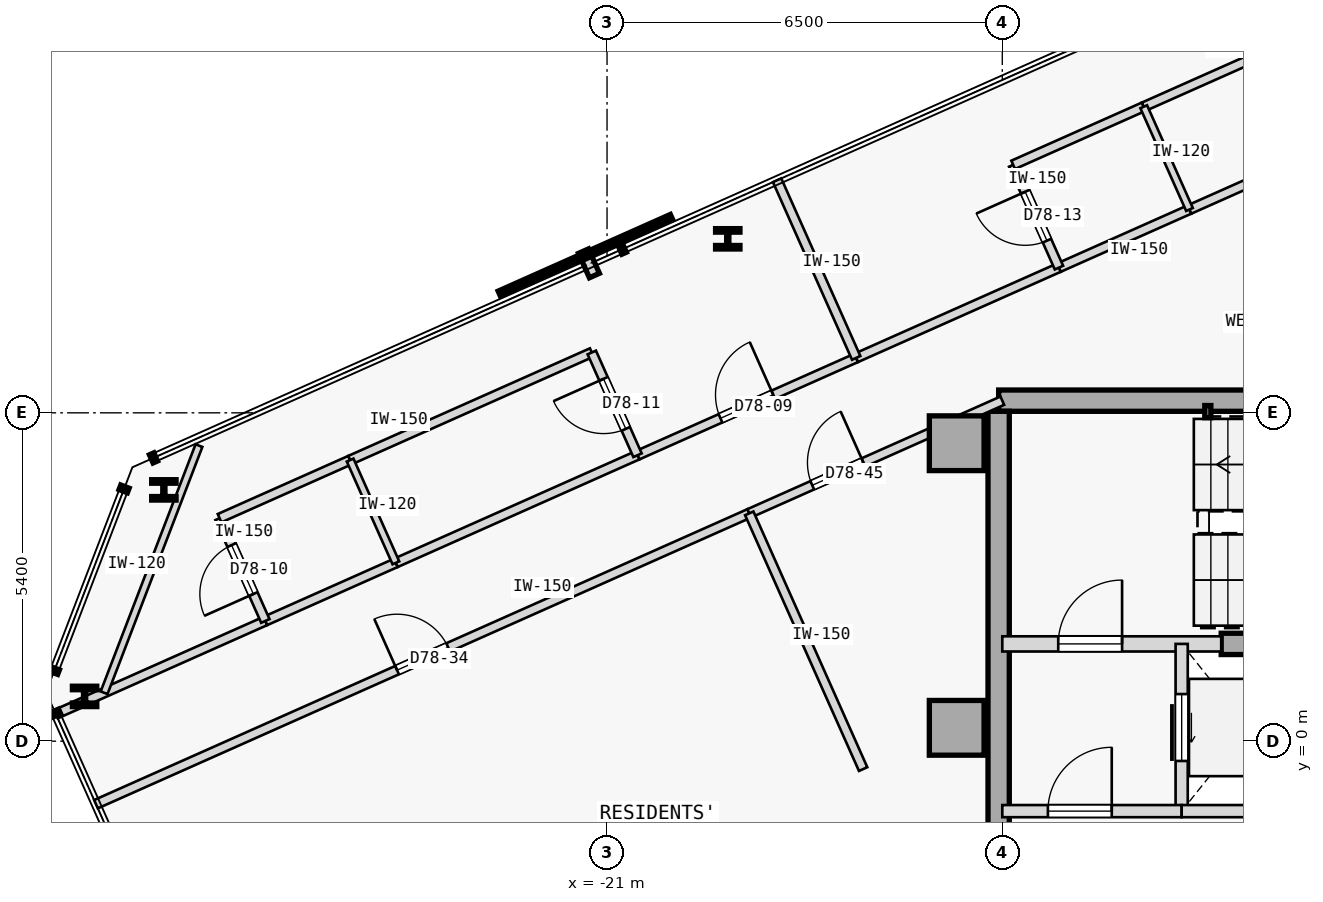
"""IFC4 building model, lengths in metres.
Left out: names, types, materials, properties, quantities, classifications, styles, units other than length and angle.
Written with IfcOpenShell. Run it as: python <this file> out.ifc"""

import sys

from ifc_helpers import new_model, si_unit, direction, frame, frame_2d, origin, origin_2d, place, context, subcontext, project, spatial, rectangle, hollow_rectangle, i_section, extrude, element, fill, save


model = new_model("IFC4")
c1 = context("Model", 3, precision=1e-05, world=origin(), true_north=direction((0.0, 1.0)))
c2 = subcontext(c1, "Body", "Model", "MODEL_VIEW")
j1 = project(units=[si_unit("LENGTHUNIT", "METRE"), si_unit("PLANEANGLEUNIT", "RADIAN")], contexts=[c1])
p1 = place(None, origin())
s1 = spatial("IfcSite", under=j1, at=p1, CompositionType="ELEMENT")
p2 = place(p1, origin())
s2 = spatial("IfcBuilding", under=s1, at=p2, CompositionType="ELEMENT")
p3 = place(p2, frame((0.0, 0.0, 291.95)))
s3 = spatial("IfcBuildingStorey", under=s2, at=p3, CompositionType="ELEMENT", Elevation=291.95)
for number, where, z_axis, x_axis in (
    (1, (-15.25, 4.9, 0.0), (0.0, 0.0, 1.0), (1.0, 0.0, 0.0)),
    (2, (-15.25, 0.22, 0.0), (0.0, 0.0, 1.0), (1.0, 0.0, 0.0)),
):
    element("IfcColumn", number, at=place(p3, frame(where, z_axis=z_axis, x_axis=x_axis)), inside=s3, PredefinedType="COLUMN", context=c2, shape_type="SweptSolid", body=[
        extrude(rectangle(XDim=0.9, YDim=0.9, at=origin_2d()), origin(), (0.0, 0.0, 1.0), 3.35),
    ])
p4 = place(p3, frame((-14.56, 5.6, 0.0), z_axis=(0.0, 0.0, 1.0), x_axis=(1.0, 0.0, 0.0)))
e3 = element("IfcWall", 3, at=p4, inside=s3, PredefinedType="SHEAR", context=c2, shape_type="SweptSolid", body=[
    extrude(rectangle(XDim=11.41, YDim=0.35, at=frame_2d((5.705, 0.0))), origin(), (0.0, 0.0, 1.0), 3.125),
])
p5 = place(p3, frame((-14.56, -5.425, 0.0), z_axis=(0.0, 0.0, 1.0), x_axis=(0.0, 1.0, 0.0)))
e4 = element("IfcWall", 4, at=p5, inside=s3, PredefinedType="SHEAR", context=c2, shape_type="SweptSolid", body=[
    extrude(rectangle(XDim=10.85, YDim=0.35, at=frame_2d((5.425, 0.0))), origin(), (0.0, 0.0, 1.0), 3.125),
])
p6 = place(p3, frame((-10.9, 1.6, 0.0), z_axis=(0.0, 0.0, 1.0), x_axis=(1.0, 0.0, 0.0)))
e5 = element("IfcWall", 5, at=p6, inside=s3, PredefinedType="SHEAR", context=c2, shape_type="SweptSolid", body=[
    extrude(rectangle(XDim=5.15, YDim=0.35, at=frame_2d((2.575, 0.0))), origin(), (0.0, 0.0, 1.0), 3.125),
])
p7 = place(p3, frame((-11.12, 5.42, 0.0), z_axis=(0.0, 0.0, 1.0), x_axis=(1.0, 0.0, 0.0)))
e6 = element("IfcColumn", 6, at=p7, inside=s3, PredefinedType="COLUMN", context=c2, shape_type="SweptSolid", body=[
    extrude(hollow_rectangle(XDim=0.1, YDim=0.2, WallThickness=0.008, at=origin_2d()), origin(), (0.0, 0.0, 1.0), 3.35),
])
for number, where, z_axis, x_axis in (
    (7, (-19.015, 8.262, 0.0), (0.0, 0.0, 1.0), (1.0, 0.0, 0.0)),
    (8, (-28.288, 4.133, 0.0), (0.0, 0.0, 1.0), (1.0, 0.0, 0.0)),
    (9, (-29.592, 0.737, 0.0), (0.0, 0.0, 1.0), (1.0, 0.0, 0.0)),
):
    element("IfcColumn", number, at=place(p3, frame(where, z_axis=z_axis, x_axis=x_axis)), inside=s3, PredefinedType="COLUMN", context=c2, shape_type="SweptSolid", body=[
        extrude(i_section(OverallWidth=0.401, OverallDepth=0.335, WebThickness=0.036, FlangeThickness=0.058, FilletRadius=0.015, at=origin_2d()), origin(), (0.0, 0.0, 1.0), 3.35),
    ])
p8 = place(p3, frame((-14.5, 1.6, 0.0), z_axis=(0.0, 0.0, 1.0), x_axis=(1.0, 0.0, 0.0)))
e10 = element("IfcWall", 10, at=p8, inside=s3, PredefinedType="STANDARD", context=c2, shape_type="SweptSolid", body=[
    extrude(rectangle(XDim=3.6, YDim=0.25, at=frame_2d((1.8, 0.0))), origin(), (0.0, 0.0, 1.0), 3.125),
])
p9 = place(p8, frame((0.92, 0.0, 0.0)))
e11 = element("IfcOpeningElement", 11, at=p9, cuts=e10, PredefinedType="OPENING", context=c2, shape_type="SweptSolid", body=[
    extrude(rectangle(XDim=1.05, YDim=2.15, at=frame_2d((0.525, 1.075))), frame((0.0, 0.135, 0.0), z_axis=(0.0, -1.0, 0.0), x_axis=(1.0, 0.0, 0.0)), (0.0, 0.0, 1.0), 0.27),
])
p10 = place(p3, frame((-11.55, -1.15, 0.0), z_axis=(0.0, 0.0, 1.0), x_axis=(0.0, 1.0, 0.0)))
e12 = element("IfcWall", 12, at=p10, inside=s3, PredefinedType="STANDARD", context=c2, shape_type="SweptSolid", body=[
    extrude(rectangle(XDim=2.75, YDim=0.2, at=frame_2d((1.375, 0.0))), origin(), (0.0, 0.0, 1.0), 3.125),
])
p11 = place(p10, frame((0.825, 0.0, 0.0)))
e13 = element("IfcOpeningElement", 13, at=p11, cuts=e12, PredefinedType="OPENING", context=c2, shape_type="SweptSolid", body=[
    extrude(rectangle(XDim=1.1, YDim=2.15, at=frame_2d((0.55, 1.075))), frame((0.0, 0.11, 0.0), z_axis=(0.0, -1.0, 0.0), x_axis=(1.0, 0.0, 0.0)), (0.0, 0.0, 1.0), 0.22),
])
p12 = place(p3, frame((-14.5, -1.15, 0.0), z_axis=(0.0, 0.0, 1.0), x_axis=(1.0, 0.0, 0.0)))
e14 = element("IfcWall", 14, at=p12, inside=s3, PredefinedType="STANDARD", context=c2, shape_type="SweptSolid", body=[
    extrude(rectangle(XDim=2.95, YDim=0.2, at=frame_2d((1.475, 0.0))), origin(), (0.0, 0.0, 1.0), 3.125),
])
p13 = place(p12, frame((0.75, 0.0, 0.0)))
e15 = element("IfcOpeningElement", 15, at=p13, cuts=e14, PredefinedType="OPENING", context=c2, shape_type="SweptSolid", body=[
    extrude(rectangle(XDim=1.05, YDim=2.18, at=frame_2d((0.525, 1.09))), frame((0.0, 0.11, 0.0), z_axis=(0.0, -1.0, 0.0), x_axis=(1.0, 0.0, 0.0)), (0.0, 0.0, 1.0), 0.22),
])
p14 = place(p3, frame((-11.55, -1.15, 0.0), z_axis=(0.0, 0.0, 1.0), x_axis=(1.0, 0.0, 0.0)))
e16 = element("IfcWall", 16, at=p14, inside=s3, PredefinedType="STANDARD", context=c2, shape_type="SweptSolid", body=[
    extrude(rectangle(XDim=2.2, YDim=0.2, at=frame_2d((1.1, 0.0))), origin(), (0.0, 0.0, 1.0), 3.125),
])
p15 = place(p3, frame((-30.063, 0.444, 0.0), z_axis=(0.0, 0.0, 1.0), x_axis=(0.913541633228, 0.406745232743, 0.0)))
e17 = element("IfcWall", 17, at=p15, inside=s3, PredefinedType="PARTITIONING", context=c2, shape_type="SweptSolid", body=[
    extrude(rectangle(XDim=3.77, YDim=0.15, at=frame_2d((1.885, 0.0))), origin(), (0.0, 0.0, 1.0), 3.125),
])
p16 = place(p3, frame((-20.499, 4.702, 0.0), z_axis=(0.0, 0.0, 1.0), x_axis=(0.913553019012, 0.406719659537, 0.0)))
e18 = element("IfcWall", 18, at=p16, inside=s3, PredefinedType="PARTITIONING", context=c2, shape_type="SweptSolid", body=[
    extrude(rectangle(XDim=3.936, YDim=0.15, at=frame_2d((1.968, 0.0))), origin(), (0.0, 0.0, 1.0), 3.125),
])
p17 = place(p16, frame((1.493, 0.0, 0.0)))
e19 = element("IfcOpeningElement", 19, at=p17, cuts=e18, PredefinedType="OPENING", context=c2, shape_type="SweptSolid", body=[
    extrude(rectangle(XDim=0.95, YDim=2.15, at=frame_2d((0.475, 1.075))), frame((0.0, 0.085, 0.0), z_axis=(0.0, -1.0, 0.0), x_axis=(1.0, 0.0, 0.0)), (0.0, 0.0, 1.0), 0.17),
])
p18 = place(p3, frame((-26.619, 1.977, 0.0), z_axis=(0.0, 0.0, 1.0), x_axis=(0.913541436194, 0.406745675276, 0.0)))
e20 = element("IfcWall", 20, at=p18, inside=s3, PredefinedType="PARTITIONING", context=c2, shape_type="SweptSolid", body=[
    extrude(rectangle(XDim=2.35, YDim=0.15, at=frame_2d((1.175, 0.0))), origin(), (0.0, 0.0, 1.0), 3.125),
])
p19 = place(p3, frame((-24.472, 2.933, 0.0), z_axis=(0.0, 0.0, 1.0), x_axis=(0.913545193015, 0.406737237438, 0.0)))
e21 = element("IfcWall", 21, at=p19, inside=s3, PredefinedType="PARTITIONING", context=c2, shape_type="SweptSolid", body=[
    extrude(rectangle(XDim=4.35, YDim=0.15, at=frame_2d((2.175, 0.0))), origin(), (0.0, 0.0, 1.0), 3.125),
])
p20 = place(p3, frame((-16.903, 6.303, 0.0), z_axis=(0.0, 0.0, 1.0), x_axis=(0.913543802, 0.40674036169, 0.0)))
e22 = element("IfcWall", 22, at=p20, inside=s3, PredefinedType="PARTITIONING", context=c2, shape_type="SweptSolid", body=[
    extrude(rectangle(XDim=3.65, YDim=0.15, at=frame_2d((1.825, 0.0))), origin(), (0.0, 0.0, 1.0), 3.125),
])
p21 = place(p3, frame((-13.568, 7.788, 0.0), z_axis=(0.0, 0.0, 1.0), x_axis=(0.913558622212, 0.406707073682, 0.0)))
e23 = element("IfcWall", 23, at=p21, inside=s3, PredefinedType="PARTITIONING", context=c2, shape_type="SweptSolid", body=[
    extrude(rectangle(XDim=2.35, YDim=0.15, at=frame_2d((1.175, 0.0))), origin(), (0.0, 0.0, 1.0), 3.125),
])
p22 = place(p3, frame((-11.421, 8.744, 0.0), z_axis=(0.0, 0.0, 1.0), x_axis=(0.913539234326, 0.406750620585, 0.0)))
e24 = element("IfcWall", 24, at=p22, inside=s3, PredefinedType="PARTITIONING", context=c2, shape_type="SweptSolid", body=[
    extrude(rectangle(XDim=3.922, YDim=0.15, at=frame_2d((1.961, 0.0))), origin(), (0.0, 0.0, 1.0), 3.125),
])
p23 = place(p3, frame((-29.404, -1.036, 0.0), z_axis=(0.0, 0.0, 1.0), x_axis=(0.913544247064, 0.406739362069, 0.0)))
e25 = element("IfcWall", 25, at=p23, inside=s3, PredefinedType="PARTITIONING", context=c2, shape_type="SweptSolid", body=[
    extrude(rectangle(XDim=11.76, YDim=0.15, at=frame_2d((5.88, 0.0))), origin(), (0.0, 0.0, 1.0), 3.125),
])
p24 = place(p23, frame((5.42, 0.0, 0.0)))
e26 = element("IfcOpeningElement", 26, at=p24, cuts=e25, PredefinedType="OPENING", context=c2, shape_type="SweptSolid", body=[
    extrude(rectangle(XDim=0.92, YDim=2.15, at=frame_2d((0.46, 1.075))), frame((0.0, 0.085, 0.0), z_axis=(0.0, -1.0, 0.0), x_axis=(1.0, 0.0, 0.0)), (0.0, 0.0, 1.0), 0.17),
])
p25 = place(p3, frame((-18.661, 3.747, 0.0), z_axis=(0.0, 0.0, 1.0), x_axis=(0.913535055583, 0.40676000568, 0.0)))
e27 = element("IfcWall", 27, at=p25, inside=s3, PredefinedType="PARTITIONING", context=c2, shape_type="SweptSolid", body=[
    extrude(rectangle(XDim=4.555, YDim=0.15, at=frame_2d((2.277, 0.0))), origin(), (0.0, 0.0, 1.0), 3.125),
])
p26 = place(p25, frame((1.134, 0.0, 0.0)))
e28 = element("IfcOpeningElement", 28, at=p26, cuts=e27, PredefinedType="OPENING", context=c2, shape_type="SweptSolid", body=[
    extrude(rectangle(XDim=0.92, YDim=2.15, at=frame_2d((0.46, 1.075))), frame((0.0, 0.085, 0.0), z_axis=(0.0, -1.0, 0.0), x_axis=(1.0, 0.0, 0.0)), (0.0, 0.0, 1.0), 0.17),
])
p27 = place(p3, frame((-26.619, 1.977, 0.0), z_axis=(0.0, 0.0, 1.0), x_axis=(-0.406750635596, 0.913539227643, 0.0)))
e29 = element("IfcWall", 29, at=p27, inside=s3, PredefinedType="PARTITIONING", context=c2, shape_type="SweptSolid", body=[
    extrude(rectangle(XDim=1.85, YDim=0.15, at=frame_2d((0.925, 0.0))), origin(), (0.0, 0.0, 1.0), 3.125),
])
p28 = place(p27, frame((0.485, 0.0, 0.0)))
e30 = element("IfcOpeningElement", 30, at=p28, cuts=e29, PredefinedType="OPENING", context=c2, shape_type="SweptSolid", body=[
    extrude(rectangle(XDim=0.88, YDim=2.15, at=frame_2d((0.44, 1.075))), frame((0.0, 0.085, 0.0), z_axis=(0.0, -1.0, 0.0), x_axis=(1.0, 0.0, 0.0)), (0.0, 0.0, 1.0), 0.17),
])
p29 = place(p3, frame((-27.372, 3.667, 0.0), z_axis=(0.0, 0.0, 1.0), x_axis=(0.913541436194, 0.406745675276, 0.0)))
e31 = element("IfcWall", 31, at=p29, inside=s3, PredefinedType="PARTITIONING", context=c2, shape_type="SweptSolid", body=[
    extrude(rectangle(XDim=2.35, YDim=0.15, at=frame_2d((1.175, 0.0))), origin(), (0.0, 0.0, 1.0), 3.125),
])
p30 = place(p3, frame((-25.225, 4.623, 0.0), z_axis=(0.0, 0.0, 1.0), x_axis=(0.913545193015, 0.406737237438, 0.0)))
e32 = element("IfcWall", 32, at=p30, inside=s3, PredefinedType="PARTITIONING", context=c2, shape_type="SweptSolid", body=[
    extrude(rectangle(XDim=4.35, YDim=0.15, at=frame_2d((2.175, 0.0))), origin(), (0.0, 0.0, 1.0), 3.125),
])
p31 = place(p3, frame((-20.499, 4.702, 0.0), z_axis=(0.0, 0.0, 1.0), x_axis=(-0.406750635596, 0.913539227643, 0.0)))
e33 = element("IfcWall", 33, at=p31, inside=s3, PredefinedType="PARTITIONING", context=c2, shape_type="SweptSolid", body=[
    extrude(rectangle(XDim=1.85, YDim=0.15, at=frame_2d((0.925, 0.0))), origin(), (0.0, 0.0, 1.0), 3.125),
])
p32 = place(p31, frame((0.475, 0.0, 0.0)))
e34 = element("IfcOpeningElement", 34, at=p32, cuts=e33, PredefinedType="OPENING", context=c2, shape_type="SweptSolid", body=[
    extrude(rectangle(XDim=0.9, YDim=2.15, at=frame_2d((0.45, 1.075))), frame((0.0, 0.085, 0.0), z_axis=(0.0, -1.0, 0.0), x_axis=(1.0, 0.0, 0.0)), (0.0, 0.0, 1.0), 0.17),
])
p33 = place(p3, frame((-16.903, 6.303, 0.0), z_axis=(0.0, 0.0, 1.0), x_axis=(-0.406733350739, 0.913546923478, 0.0)))
e35 = element("IfcWall", 35, at=p33, inside=s3, PredefinedType="PARTITIONING", context=c2, shape_type="SweptSolid", body=[
    extrude(rectangle(XDim=3.198, YDim=0.15, at=frame_2d((1.599, 0.0))), origin(), (0.0, 0.0, 1.0), 3.125),
])
p34 = place(p3, frame((-24.472, 2.933, 0.0), z_axis=(0.0, 0.0, 1.0), x_axis=(-0.406750635596, 0.913539227643, 0.0)))
e36 = element("IfcWall", 36, at=p34, inside=s3, PredefinedType="PARTITIONING", context=c2, shape_type="SweptSolid", body=[
    extrude(rectangle(XDim=1.85, YDim=0.12, at=frame_2d((0.925, 0.0))), origin(), (0.0, 0.0, 1.0), 3.125),
])
p35 = place(p3, frame((-13.568, 7.788, 0.0), z_axis=(0.0, 0.0, 1.0), x_axis=(-0.406750635596, 0.913539227643, 0.0)))
e37 = element("IfcWall", 37, at=p35, inside=s3, PredefinedType="PARTITIONING", context=c2, shape_type="SweptSolid", body=[
    extrude(rectangle(XDim=1.85, YDim=0.15, at=frame_2d((0.925, 0.0))), origin(), (0.0, 0.0, 1.0), 3.125),
])
p36 = place(p35, frame((0.485, 0.0, 0.0)))
e38 = element("IfcOpeningElement", 38, at=p36, cuts=e37, PredefinedType="OPENING", context=c2, shape_type="SweptSolid", body=[
    extrude(rectangle(XDim=0.88, YDim=2.15, at=frame_2d((0.44, 1.075))), frame((0.0, 0.085, 0.0), z_axis=(0.0, -1.0, 0.0), x_axis=(1.0, 0.0, 0.0)), (0.0, 0.0, 1.0), 0.17),
])
p37 = place(p3, frame((-14.321, 9.478, 0.0), z_axis=(0.0, 0.0, 1.0), x_axis=(0.913502828817, 0.406832375486, 0.0)))
e39 = element("IfcWall", 39, at=p37, inside=s3, PredefinedType="PARTITIONING", context=c2, shape_type="SweptSolid", body=[
    extrude(rectangle(XDim=2.35, YDim=0.15, at=frame_2d((1.175, 0.0))), origin(), (0.0, 0.0, 1.0), 3.125),
])
p38 = place(p3, frame((-12.174, 10.434, 0.0), z_axis=(0.0, 0.0, 1.0), x_axis=(0.913549532696, 0.406727490232, 0.0)))
e40 = element("IfcWall", 40, at=p38, inside=s3, PredefinedType="PARTITIONING", context=c2, shape_type="SweptSolid", body=[
    extrude(rectangle(XDim=3.922, YDim=0.15, at=frame_2d((1.961, 0.0))), origin(), (0.0, 0.0, 1.0), 3.125),
])
p39 = place(p3, frame((-11.421, 8.744, 0.0), z_axis=(0.0, 0.0, 1.0), x_axis=(-0.406811725227, 0.913512025218, 0.0)))
e41 = element("IfcWall", 41, at=p39, inside=s3, PredefinedType="PARTITIONING", context=c2, shape_type="SweptSolid", body=[
    extrude(rectangle(XDim=1.85, YDim=0.12, at=frame_2d((0.925, 0.0))), origin(), (0.0, 0.0, 1.0), 3.125),
])
p40 = place(p3, frame((-16.789, -0.459, 0.0), z_axis=(0.0, 0.0, 1.0), x_axis=(-0.406738654026, 0.913544562307, 0.0)))
e42 = element("IfcWall", 42, at=p40, inside=s3, PredefinedType="PARTITIONING", context=c2, shape_type="SweptSolid", body=[
    extrude(rectangle(XDim=4.604, YDim=0.15, at=frame_2d((2.302, 0.0))), origin(), (0.0, 0.0, 1.0), 3.125),
])
p41 = place(p3, frame((-29.271, 0.797, 0.0), z_axis=(0.0, 0.0, 1.0), x_axis=(0.358310046253, 0.933602651428, 0.0)))
e43 = element("IfcWall", 43, at=p41, inside=s3, PredefinedType="PARTITIONING", context=c2, shape_type="SweptSolid", body=[
    extrude(rectangle(XDim=4.353, YDim=0.12, at=frame_2d((2.177, 0.0))), origin(), (0.0, 0.0, 1.0), 3.125),
])
p42 = place(p9, origin())
e44 = element("IfcDoor", 44, at=p42, inside=s3, OperationType="SINGLE_SWING_RIGHT", PredefinedType="DOOR", context=c2, shape_type="SweptSolid", body=[
    extrude(rectangle(XDim=1.05, YDim=2.15, at=frame_2d((0.525, 1.075))), frame((0.0, 0.025, 0.0), z_axis=(0.0, -1.0, 0.0), x_axis=(1.0, 0.0, 0.0)), (0.0, 0.0, 1.0), 0.05),
])
fill(e11, e44)
p43 = place(p13, origin())
e45 = element("IfcDoor", 45, at=p43, inside=s3, OperationType="SINGLE_SWING_RIGHT", PredefinedType="DOOR", context=c2, shape_type="SweptSolid", body=[
    extrude(rectangle(XDim=1.05, YDim=2.18, at=frame_2d((0.525, 1.09))), frame((0.0, 0.025, 0.0), z_axis=(0.0, -1.0, 0.0), x_axis=(1.0, 0.0, 0.0)), (0.0, 0.0, 1.0), 0.05),
])
fill(e15, e45)
p44 = place(p11, origin())
e46 = element("IfcDoor", 46, at=p44, inside=s3, OperationType="SLIDING_TO_RIGHT", PredefinedType="DOOR", context=c2, shape_type="SweptSolid", body=[
    extrude(rectangle(XDim=1.1, YDim=2.15, at=frame_2d((0.55, 1.075))), frame((0.0, 0.025, 0.0), z_axis=(0.0, -1.0, 0.0), x_axis=(1.0, 0.0, 0.0)), (0.0, 0.0, 1.0), 0.05),
])
fill(e13, e46)
p45 = place(p17, origin())
e47 = element("IfcDoor", 47, at=p45, inside=s3, OperationType="SINGLE_SWING_RIGHT", PredefinedType="DOOR", context=c2, shape_type="SweptSolid", body=[
    extrude(rectangle(XDim=0.95, YDim=2.15, at=frame_2d((0.475, 1.075))), frame((0.0, 0.025, 0.0), z_axis=(0.0, -1.0, 0.0), x_axis=(1.0, 0.0, 0.0)), (0.0, 0.0, 1.0), 0.05),
])
fill(e19, e47)
p46 = place(p28, origin())
e48 = element("IfcDoor", 48, at=p46, inside=s3, OperationType="SINGLE_SWING_LEFT", PredefinedType="DOOR", context=c2, shape_type="SweptSolid", body=[
    extrude(rectangle(XDim=0.88, YDim=2.15, at=frame_2d((0.44, 1.075))), frame((0.0, 0.025, 0.0), z_axis=(0.0, -1.0, 0.0), x_axis=(1.0, 0.0, 0.0)), (0.0, 0.0, 1.0), 0.05),
])
fill(e30, e48)
p47 = place(p32, origin())
e49 = element("IfcDoor", 49, at=p47, inside=s3, OperationType="SINGLE_SWING_RIGHT", PredefinedType="DOOR", context=c2, shape_type="SweptSolid", body=[
    extrude(rectangle(XDim=0.9, YDim=2.15, at=frame_2d((0.45, 1.075))), frame((0.0, 0.025, 0.0), z_axis=(0.0, -1.0, 0.0), x_axis=(1.0, 0.0, 0.0)), (0.0, 0.0, 1.0), 0.05),
])
fill(e34, e49)
p48 = place(p36, origin())
e50 = element("IfcDoor", 50, at=p48, inside=s3, OperationType="SINGLE_SWING_RIGHT", PredefinedType="DOOR", context=c2, shape_type="SweptSolid", body=[
    extrude(rectangle(XDim=0.88, YDim=2.15, at=frame_2d((0.44, 1.075))), frame((0.0, 0.025, 0.0), z_axis=(0.0, -1.0, 0.0), x_axis=(1.0, 0.0, 0.0)), (0.0, 0.0, 1.0), 0.05),
])
fill(e38, e50)
p49 = place(p24, origin())
e51 = element("IfcDoor", 51, at=p49, inside=s3, OperationType="SINGLE_SWING_LEFT", PredefinedType="DOOR", context=c2, shape_type="SweptSolid", body=[
    extrude(rectangle(XDim=0.92, YDim=2.15, at=frame_2d((0.46, 1.075))), frame((0.0, 0.025, 0.0), z_axis=(0.0, -1.0, 0.0), x_axis=(1.0, 0.0, 0.0)), (0.0, 0.0, 1.0), 0.05),
])
fill(e26, e51)
p50 = place(p26, origin())
e52 = element("IfcDoor", 52, at=p50, inside=s3, OperationType="SINGLE_SWING_RIGHT", PredefinedType="DOOR", context=c2, shape_type="SweptSolid", body=[
    extrude(rectangle(XDim=0.92, YDim=2.15, at=frame_2d((0.46, 1.075))), frame((0.0, 0.025, 0.0), z_axis=(0.0, -1.0, 0.0), x_axis=(1.0, 0.0, 0.0)), (0.0, 0.0, 1.0), 0.05),
])
fill(e28, e52)
save(model, sys.argv[1])
